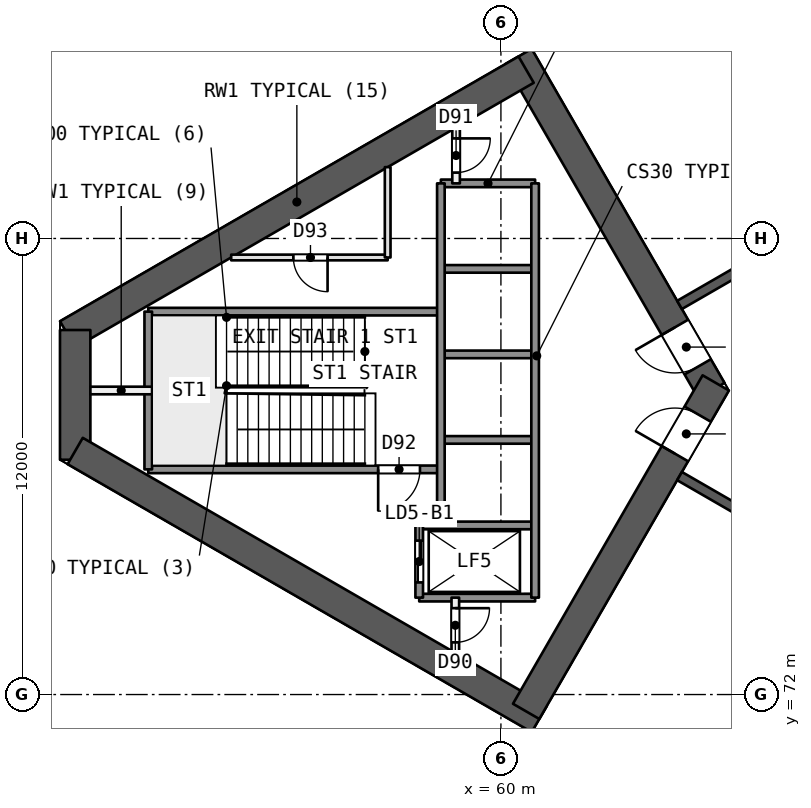
"""IFC4 building model, lengths in metres.
Left out: names, types, materials, properties, quantities, classifications, styles, units other than length and angle.
Written with IfcOpenShell. Run it as: python <this file> out.ifc"""

import sys

from ifc_helpers import new_model, si_unit, direction, frame, frame_2d, origin, place, context, subcontext, project, spatial, rectangle, extrude, element, fill, save


model = new_model("IFC4")
c1 = context("Model", 3, precision=1e-05, world=origin(), true_north=direction((0.0, 1.0)))
c2 = subcontext(c1, "Body", "Model", "MODEL_VIEW")
j1 = project(units=[si_unit("LENGTHUNIT", "METRE"), si_unit("PLANEANGLEUNIT", "RADIAN")], contexts=[c1])
p1 = place(None, origin())
s1 = spatial("IfcSite", under=j1, at=p1, CompositionType="ELEMENT")
p2 = place(p1, origin())
s2 = spatial("IfcBuilding", under=s1, at=p2, CompositionType="ELEMENT")
p3 = place(p2, frame((0.0, 0.0, -4.5)))
s3 = spatial("IfcBuildingStorey", under=s2, at=p3, CompositionType="ELEMENT", Elevation=-4.5)
p4 = place(p3, frame((94.84, 122.4, 0.0), z_axis=(0.0, 0.0, 1.0), x_axis=(-0.866026157749, -0.499998694092, 0.0)))
e1 = element("IfcWall", 1, at=p4, inside=s3, PredefinedType="SOLIDWALL", context=c2, shape_type="SweptSolid", body=[
    extrude(rectangle(XDim=76.937, YDim=0.6, at=frame_2d((38.469, 0.0))), origin(), (0.0, 0.0, 1.0), 4.1),
])
p5 = place(p3, frame((28.36, 75.981, 0.0), z_axis=(0.0, 0.0, 1.0), x_axis=(0.866025364439, -0.500000068148, 0.0)))
e2 = element("IfcWall", 2, at=p5, inside=s3, PredefinedType="SOLIDWALL", context=c2, shape_type="SweptSolid", body=[
    extrude(rectangle(XDim=76.937, YDim=0.6, at=frame_2d((38.469, 0.0))), origin(), (0.0, 0.0, 1.0), 4.1),
])
p6 = place(p3, frame((65.538, 80.0, 0.0), z_axis=(0.0, 0.0, 1.0), x_axis=(-0.49999662545, 0.866027352073, 0.0)))
e3 = element("IfcWall", 3, at=p6, inside=s3, PredefinedType="SHEAR", context=c2, shape_type="SweptSolid", body=[
    extrude(rectangle(XDim=10.149, YDim=0.8, at=frame_2d((5.074, 0.0))), origin(), (0.0, 0.0, 1.0), 4.5),
])
p7 = place(p6, frame((0.719, 0.0, 0.0)))
e4 = element("IfcOpeningElement", 4, at=p7, cuts=e3, PredefinedType="OPENING", context=c2, shape_type="SweptSolid", body=[
    extrude(rectangle(XDim=1.2, YDim=2.1, at=frame_2d((0.6, 1.05))), frame((0.0, 0.411, 0.0), z_axis=(0.0, -1.0, 0.0), x_axis=(1.0, 0.0, 0.0)), (0.0, 0.0, 1.0), 0.821),
])
p8 = place(p3, frame((60.664, 88.443, 0.0), z_axis=(0.0, 0.0, 1.0), x_axis=(-0.866029478545, -0.499992942241, 0.0)))
e5 = element("IfcWall", 5, at=p8, inside=s3, PredefinedType="SHEAR", context=c2, shape_type="SweptSolid", body=[
    extrude(rectangle(XDim=13.933, YDim=0.8, at=frame_2d((6.967, 0.0))), origin(), (0.0, 0.0, 1.0), 4.5),
])
p9 = place(p3, frame((48.797, 81.592, 0.0), z_axis=(0.0, 0.0, 1.0), x_axis=(0.0, -1.0, 0.0)))
e6 = element("IfcWall", 6, at=p9, inside=s3, PredefinedType="SHEAR", context=c2, shape_type="SweptSolid", body=[
    extrude(rectangle(XDim=3.415, YDim=0.8, at=frame_2d((1.707, 0.0))), origin(), (0.0, 0.0, 1.0), 4.5),
])
p10 = place(p3, frame((48.797, 78.408, 0.0), z_axis=(0.0, 0.0, 1.0), x_axis=(0.866032504327, -0.499987701298, 0.0)))
e7 = element("IfcWall", 7, at=p10, inside=s3, PredefinedType="SHEAR", context=c2, shape_type="SweptSolid", body=[
    extrude(rectangle(XDim=14.102, YDim=0.8, at=frame_2d((7.051, 0.0))), origin(), (0.0, 0.0, 1.0), 4.5),
])
p11 = place(p3, frame((60.664, 71.557, 0.0), z_axis=(0.0, 0.0, 1.0), x_axis=(0.50000409368, 0.866023040284, 0.0)))
e8 = element("IfcWall", 8, at=p11, inside=s3, PredefinedType="SHEAR", context=c2, shape_type="SweptSolid", body=[
    extrude(rectangle(XDim=9.98, YDim=0.8, at=frame_2d((4.99, 0.0))), origin(), (0.0, 0.0, 1.0), 4.5),
])
p12 = place(p11, frame((7.83, 0.0, 0.0)))
e9 = element("IfcOpeningElement", 9, at=p12, cuts=e8, PredefinedType="OPENING", context=c2, shape_type="SweptSolid", body=[
    extrude(rectangle(XDim=1.2, YDim=2.1, at=frame_2d((0.6, 1.05))), frame((0.0, 0.411, 0.0), z_axis=(0.0, -1.0, 0.0), x_axis=(1.0, 0.0, 0.0)), (0.0, 0.0, 1.0), 0.821),
])
for number, where, z_axis, x_axis in (
    (10, (78.2, 90.046, 0.0), (0.0, 0.0, 1.0), (-0.866, -0.5, 0.0)),
    (11, (64.7, 77.748, 0.0), (0.0, 0.0, 1.0), (0.866, -0.5, 0.0)),
):
    element("IfcWall", number, at=place(p3, frame(where, z_axis=z_axis, x_axis=x_axis)), inside=s3, PredefinedType="SHEAR", context=c2, shape_type="SweptSolid", body=[
        extrude(rectangle(XDim=15.588, YDim=0.25, at=frame_2d((7.794, 0.0))), origin(), (0.0, 0.0, 1.0), 4.1),
    ])
p13 = place(p3, frame((60.9, 85.45, 0.0), z_axis=(0.0, 0.0, 1.0), x_axis=(-1.0, 0.0, 0.0)))
e12 = element("IfcWall", 12, at=p13, inside=s3, PredefinedType="SOLIDWALL", context=c2, shape_type="SweptSolid", body=[
    extrude(rectangle(XDim=2.48, YDim=0.2, at=frame_2d((1.24, 0.0))), origin(), (0.0, 0.0, 1.0), 4.1),
])
p14 = place(p3, frame((57.02, 83.5, 0.0), z_axis=(0.0, 0.0, 1.0), x_axis=(-1.0, 0.0, 0.0)))
e13 = element("IfcWall", 13, at=p14, inside=s3, PredefinedType="PARTITIONING", context=c2, shape_type="SweptSolid", body=[
    extrude(rectangle(XDim=4.118, YDim=0.15, at=frame_2d((2.059, 0.0))), origin(), (0.0, 0.0, 1.0), 4.1),
])
p15 = place(p14, frame((1.582, 0.0, 0.0)))
e14 = element("IfcOpeningElement", 14, at=p15, cuts=e13, PredefinedType="OPENING", context=c2, shape_type="SweptSolid", body=[
    extrude(rectangle(XDim=0.9, YDim=2.1, at=frame_2d((0.45, 1.05))), frame((0.0, 0.085, 0.0), z_axis=(0.0, -1.0, 0.0), x_axis=(1.0, 0.0, 0.0)), (0.0, 0.0, 1.0), 0.171),
])
p16 = place(p3, frame((60.9, 83.2, 0.0), z_axis=(0.0, 0.0, 1.0), x_axis=(-1.0, 0.0, 0.0)))
e15 = element("IfcWall", 15, at=p16, inside=s3, PredefinedType="SOLIDWALL", context=c2, shape_type="SweptSolid", body=[
    extrude(rectangle(XDim=2.48, YDim=0.2, at=frame_2d((1.24, 0.0))), origin(), (0.0, 0.0, 1.0), 4.1),
])
p17 = place(p3, frame((58.42, 82.075, 0.0), z_axis=(0.0, 0.0, 1.0), x_axis=(-1.0, 0.0, 0.0)))
e16 = element("IfcWall", 16, at=p17, inside=s3, PredefinedType="SOLIDWALL", context=c2, shape_type="SweptSolid", body=[
    extrude(rectangle(XDim=7.7, YDim=0.2, at=frame_2d((3.85, 0.0))), origin(), (0.0, 0.0, 1.0), 4.1),
])
p18 = place(p3, frame((60.9, 80.95, 0.0), z_axis=(0.0, 0.0, 1.0), x_axis=(-1.0, 0.0, 0.0)))
e17 = element("IfcWall", 17, at=p18, inside=s3, PredefinedType="SOLIDWALL", context=c2, shape_type="SweptSolid", body=[
    extrude(rectangle(XDim=2.48, YDim=0.2, at=frame_2d((1.24, 0.0))), origin(), (0.0, 0.0, 1.0), 4.1),
])
p19 = place(p3, frame((50.82, 80.0, 0.0), z_axis=(0.0, 0.0, 1.0), x_axis=(-1.0, 0.0, 0.0)))
e18 = element("IfcWall", 18, at=p19, inside=s3, PredefinedType="PARTITIONING", context=c2, shape_type="SweptSolid", body=[
    extrude(rectangle(XDim=1.623, YDim=0.2, at=frame_2d((0.812, 0.0))), origin(), (0.0, 0.0, 1.0), 4.1),
])
p20 = place(p3, frame((60.9, 78.7, 0.0), z_axis=(0.0, 0.0, 1.0), x_axis=(-1.0, 0.0, 0.0)))
e19 = element("IfcWall", 19, at=p20, inside=s3, PredefinedType="SOLIDWALL", context=c2, shape_type="SweptSolid", body=[
    extrude(rectangle(XDim=2.48, YDim=0.2, at=frame_2d((1.24, 0.0))), origin(), (0.0, 0.0, 1.0), 4.1),
])
p21 = place(p3, frame((58.42, 77.925, 0.0), z_axis=(0.0, 0.0, 1.0), x_axis=(-1.0, 0.0, 0.0)))
e20 = element("IfcWall", 20, at=p21, inside=s3, PredefinedType="SOLIDWALL", context=c2, shape_type="SweptSolid", body=[
    extrude(rectangle(XDim=7.7, YDim=0.2, at=frame_2d((3.85, 0.0))), origin(), (0.0, 0.0, 1.0), 4.1),
])
p22 = place(p21, frame((0.55, 0.0, 0.0)))
e21 = element("IfcOpeningElement", 21, at=p22, cuts=e20, PredefinedType="OPENING", context=c2, shape_type="SweptSolid", body=[
    extrude(rectangle(XDim=1.1, YDim=2.1, at=frame_2d((0.55, 1.05))), frame((0.0, 0.11, 0.0), z_axis=(0.0, -1.0, 0.0), x_axis=(1.0, 0.0, 0.0)), (0.0, 0.0, 1.0), 0.221),
])
for number, where, z_axis, x_axis in (
    (22, (60.9, 76.45, 0.0), (0.0, 0.0, 1.0), (-1.0, 0.0, 0.0)),
    (23, (60.9, 74.55, 0.0), (0.0, 0.0, 1.0), (-1.0, 0.0, 0.0)),
):
    element("IfcWall", number, at=place(p3, frame(where, z_axis=z_axis, x_axis=x_axis)), inside=s3, PredefinedType="SOLIDWALL", context=c2, shape_type="SweptSolid", body=[
        extrude(rectangle(XDim=3.05, YDim=0.2, at=frame_2d((1.525, 0.0))), origin(), (0.0, 0.0, 1.0), 4.1),
    ])
p23 = place(p3, frame((60.9, 85.45, 0.0), z_axis=(0.0, 0.0, 1.0), x_axis=(0.0, -1.0, 0.0)))
e24 = element("IfcWall", 24, at=p23, inside=s3, PredefinedType="SOLIDWALL", context=c2, shape_type="SweptSolid", body=[
    extrude(rectangle(XDim=10.9, YDim=0.2, at=frame_2d((5.45, 0.0))), origin(), (0.0, 0.0, 1.0), 4.1),
])
p24 = place(p3, frame((58.82, 86.917, 0.0), z_axis=(0.0, 0.0, 1.0), x_axis=(0.0, -1.0, 0.0)))
e25 = element("IfcWall", 25, at=p24, inside=s3, PredefinedType="PARTITIONING", context=c2, shape_type="SweptSolid", body=[
    extrude(rectangle(XDim=1.467, YDim=0.2, at=frame_2d((0.733, 0.0))), origin(), (0.0, 0.0, 1.0), 4.1),
])
p25 = place(p24, frame((0.283, 0.0, 0.0)))
e26 = element("IfcOpeningElement", 26, at=p25, cuts=e25, PredefinedType="OPENING", context=c2, shape_type="SweptSolid", body=[
    extrude(rectangle(XDim=0.9, YDim=2.1, at=frame_2d((0.45, 1.05))), frame((0.0, 0.11, 0.0), z_axis=(0.0, -1.0, 0.0), x_axis=(1.0, 0.0, 0.0)), (0.0, 0.0, 1.0), 0.221),
])
p26 = place(p3, frame((58.8, 74.55, 0.0), z_axis=(0.0, 0.0, 1.0), x_axis=(0.0, -1.0, 0.0)))
e27 = element("IfcWall", 27, at=p26, inside=s3, PredefinedType="PARTITIONING", context=c2, shape_type="SweptSolid", body=[
    extrude(rectangle(XDim=1.455, YDim=0.2, at=frame_2d((0.728, 0.0))), origin(), (0.0, 0.0, 1.0), 4.1),
])
p27 = place(p26, frame((0.278, 0.0, 0.0)))
e28 = element("IfcOpeningElement", 28, at=p27, cuts=e27, PredefinedType="OPENING", context=c2, shape_type="SweptSolid", body=[
    extrude(rectangle(XDim=0.9, YDim=2.1, at=frame_2d((0.45, 1.05))), frame((0.0, 0.11, 0.0), z_axis=(0.0, -1.0, 0.0), x_axis=(1.0, 0.0, 0.0)), (0.0, 0.0, 1.0), 0.221),
])
p28 = place(p3, frame((58.42, 85.45, 0.0), z_axis=(0.0, 0.0, 1.0), x_axis=(0.0, -1.0, 0.0)))
e29 = element("IfcWall", 29, at=p28, inside=s3, PredefinedType="SOLIDWALL", context=c2, shape_type="SweptSolid", body=[
    extrude(rectangle(XDim=9.0, YDim=0.2, at=frame_2d((4.5, 0.0))), origin(), (0.0, 0.0, 1.0), 4.1),
])
p29 = place(p3, frame((57.85, 76.45, 0.0), z_axis=(0.0, 0.0, 1.0), x_axis=(0.0, -1.0, 0.0)))
e30 = element("IfcWall", 30, at=p29, inside=s3, PredefinedType="SOLIDWALL", context=c2, shape_type="SweptSolid", body=[
    extrude(rectangle(XDim=1.9, YDim=0.2, at=frame_2d((0.95, 0.0))), origin(), (0.0, 0.0, 1.0), 4.1),
])
p30 = place(p29, frame((0.4, 0.0, 0.0)))
e31 = element("IfcOpeningElement", 31, at=p30, cuts=e30, PredefinedType="OPENING", context=c2, shape_type="SweptSolid", body=[
    extrude(rectangle(XDim=1.1, YDim=2.1, at=frame_2d((0.55, 1.05))), frame((0.0, 0.11, 0.0), z_axis=(0.0, -1.0, 0.0), x_axis=(1.0, 0.0, 0.0)), (0.0, 0.0, 1.0), 0.221),
])
p31 = place(p3, frame((57.02, 85.877, 0.0), z_axis=(0.0, 0.0, 1.0), x_axis=(0.0, -1.0, 0.0)))
e32 = element("IfcWall", 32, at=p31, inside=s3, PredefinedType="PARTITIONING", context=c2, shape_type="SweptSolid", body=[
    extrude(rectangle(XDim=2.377, YDim=0.15, at=frame_2d((1.189, 0.0))), origin(), (0.0, 0.0, 1.0), 4.1),
])
p32 = place(p3, frame((50.72, 82.075, 0.0), z_axis=(0.0, 0.0, 1.0), x_axis=(0.0, -1.0, 0.0)))
e33 = element("IfcWall", 33, at=p32, inside=s3, PredefinedType="SOLIDWALL", context=c2, shape_type="SweptSolid", body=[
    extrude(rectangle(XDim=4.15, YDim=0.2, at=frame_2d((2.075, 0.0))), origin(), (0.0, 0.0, 1.0), 4.1),
])
p33 = place(p7, origin())
e34 = element("IfcDoor", 34, at=p33, inside=s3, OperationType="SINGLE_SWING_RIGHT", PredefinedType="NOTDEFINED", context=c2, shape_type="SweptSolid", body=[
    extrude(rectangle(XDim=1.2, YDim=2.1, at=frame_2d((0.6, 1.05))), frame((0.0, 0.025, 0.0), z_axis=(0.0, -1.0, 0.0), x_axis=(1.0, 0.0, 0.0)), (0.0, 0.0, 1.0), 0.05),
])
fill(e4, e34)
p34 = place(p12, origin())
e35 = element("IfcDoor", 35, at=p34, inside=s3, OperationType="SINGLE_SWING_LEFT", PredefinedType="NOTDEFINED", context=c2, shape_type="SweptSolid", body=[
    extrude(rectangle(XDim=1.2, YDim=2.1, at=frame_2d((0.6, 1.05))), frame((0.0, 0.025, 0.0), z_axis=(0.0, -1.0, 0.0), x_axis=(1.0, 0.0, 0.0)), (0.0, 0.0, 1.0), 0.05),
])
fill(e9, e35)
p35 = place(p30, origin())
e36 = element("IfcDoor", 36, at=p35, inside=s3, OperationType="SLIDING_TO_RIGHT", PredefinedType="NOTDEFINED", context=c2, shape_type="SweptSolid", body=[
    extrude(rectangle(XDim=1.1, YDim=2.1, at=frame_2d((0.55, 1.05))), frame((0.0, 0.025, 0.0), z_axis=(0.0, -1.0, 0.0), x_axis=(1.0, 0.0, 0.0)), (0.0, 0.0, 1.0), 0.05),
])
fill(e31, e36)
p36 = place(p27, origin())
e37 = element("IfcDoor", 37, at=p36, inside=s3, OperationType="SINGLE_SWING_LEFT", PredefinedType="NOTDEFINED", context=c2, shape_type="SweptSolid", body=[
    extrude(rectangle(XDim=0.9, YDim=2.1, at=frame_2d((0.45, 1.05))), frame((0.0, 0.025, 0.0), z_axis=(0.0, -1.0, 0.0), x_axis=(1.0, 0.0, 0.0)), (0.0, 0.0, 1.0), 0.05),
])
fill(e28, e37)
p37 = place(p25, origin())
e38 = element("IfcDoor", 38, at=p37, inside=s3, OperationType="SINGLE_SWING_LEFT", PredefinedType="NOTDEFINED", context=c2, shape_type="SweptSolid", body=[
    extrude(rectangle(XDim=0.9, YDim=2.1, at=frame_2d((0.45, 1.05))), frame((0.0, 0.025, 0.0), z_axis=(0.0, -1.0, 0.0), x_axis=(1.0, 0.0, 0.0)), (0.0, 0.0, 1.0), 0.05),
])
fill(e26, e38)
p38 = place(p22, origin())
e39 = element("IfcDoor", 39, at=p38, inside=s3, OperationType="SINGLE_SWING_RIGHT", PredefinedType="NOTDEFINED", context=c2, shape_type="SweptSolid", body=[
    extrude(rectangle(XDim=1.1, YDim=2.1, at=frame_2d((0.55, 1.05))), frame((0.0, 0.025, 0.0), z_axis=(0.0, -1.0, 0.0), x_axis=(1.0, 0.0, 0.0)), (0.0, 0.0, 1.0), 0.05),
])
fill(e21, e39)
p39 = place(p15, origin())
e40 = element("IfcDoor", 40, at=p39, inside=s3, OperationType="SINGLE_SWING_LEFT", PredefinedType="NOTDEFINED", context=c2, shape_type="SweptSolid", body=[
    extrude(rectangle(XDim=0.9, YDim=2.1, at=frame_2d((0.45, 1.05))), frame((0.0, 0.025, 0.0), z_axis=(0.0, -1.0, 0.0), x_axis=(1.0, 0.0, 0.0)), (0.0, 0.0, 1.0), 0.05),
])
fill(e14, e40)
save(model, sys.argv[1])
